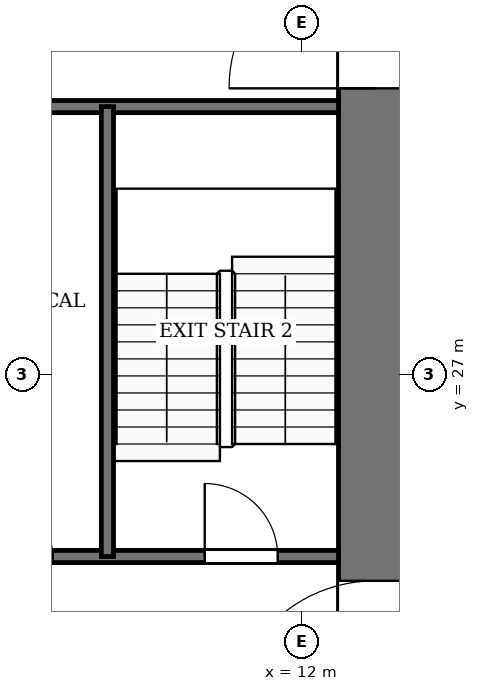
"""IFC4 building model, lengths in metres.
Left out: names, types, materials, properties, quantities, classifications, styles, units other than length and angle.
Written with IfcOpenShell. Run it as: python <this file> out.ifc"""

import sys

from ifc_helpers import new_model, si_unit, direction, frame, frame_2d, origin, place, context, subcontext, project, spatial, rectangle, extrude, element, fill, save


model = new_model("IFC4")
c1 = context("Model", 3, precision=1e-05, world=origin(), true_north=direction((0.0, 1.0)))
c2 = subcontext(c1, "Body", "Model", "MODEL_VIEW")
j1 = project(units=[si_unit("LENGTHUNIT", "METRE"), si_unit("PLANEANGLEUNIT", "RADIAN")], contexts=[c1])
p1 = place(None, origin())
s1 = spatial("IfcSite", under=j1, at=p1, CompositionType="ELEMENT")
p2 = place(p1, origin())
s2 = spatial("IfcBuilding", under=s1, at=p2, CompositionType="ELEMENT")
p3 = place(p2, frame((0.0, 0.0, 110.0)))
s3 = spatial("IfcBuildingStorey", under=s2, at=p3, CompositionType="ELEMENT", Elevation=110.0)
p4 = place(p3, frame((13.2, 18.4, -0.13), z_axis=(0.0, 0.0, 1.0), x_axis=(0.0, 1.0, 0.0)))
e1 = element("IfcWall", 1, at=p4, inside=s3, PredefinedType="SHEAR", context=c2, shape_type="SweptSolid", body=[
    extrude(rectangle(XDim=19.2, YDim=1.2, at=frame_2d((9.6, 0.0))), origin(), (0.0, 0.0, 1.0), 3.88),
])
p5 = place(p4, frame((2.8, 0.0, 0.13)))
e2 = element("IfcOpeningElement", 2, at=p5, cuts=e1, PredefinedType="OPENING", context=c2, shape_type="SweptSolid", body=[
    extrude(rectangle(XDim=2.4, YDim=2.4, at=frame_2d((1.2, 1.2))), frame((0.0, 0.61, 0.0), z_axis=(0.0, -1.0, 0.0), x_axis=(1.0, 0.0, 0.0)), (0.0, 0.0, 1.0), 1.22),
])
p6 = place(p4, frame((13.3, 0.0, 0.13)))
e3 = element("IfcOpeningElement", 3, at=p6, cuts=e1, PredefinedType="OPENING", context=c2, shape_type="SweptSolid", body=[
    extrude(rectangle(XDim=2.4, YDim=2.4, at=frame_2d((1.2, 1.2))), frame((0.0, 0.61, 0.0), z_axis=(0.0, -1.0, 0.0), x_axis=(1.0, 0.0, 0.0)), (0.0, 0.0, 1.0), 1.22),
])
p7 = place(p3, frame((6.0, 24.0, 0.0), z_axis=(0.0, 0.0, 1.0), x_axis=(1.0, 0.0, 0.0)))
e4 = element("IfcWall", 4, at=p7, inside=s3, PredefinedType="PARTITIONING", context=c2, shape_type="SweptSolid", body=[
    extrude(rectangle(XDim=6.6, YDim=0.2, at=frame_2d((3.3, 0.0))), origin(), (0.0, 0.0, 1.0), 3.75),
])
p8 = place(p7, frame((0.9, 0.0, 0.0)))
e5 = element("IfcOpeningElement", 5, at=p8, cuts=e4, PredefinedType="OPENING", context=c2, shape_type="SweptSolid", body=[
    extrude(rectangle(XDim=1.0, YDim=2.1, at=frame_2d((0.5, 1.05))), frame((0.0, 0.11, 0.0), z_axis=(0.0, -1.0, 0.0), x_axis=(1.0, 0.0, 0.0)), (0.0, 0.0, 1.0), 0.22),
])
p9 = place(p7, frame((4.4, 0.0, 0.0)))
e6 = element("IfcOpeningElement", 6, at=p9, cuts=e4, PredefinedType="OPENING", context=c2, shape_type="SweptSolid", body=[
    extrude(rectangle(XDim=1.2, YDim=2.2, at=frame_2d((0.6, 1.1))), frame((0.0, 0.11, 0.0), z_axis=(0.0, -1.0, 0.0), x_axis=(1.0, 0.0, 0.0)), (0.0, 0.0, 1.0), 0.22),
])
p10 = place(p3, frame((6.0, 31.4, 0.0), z_axis=(0.0, 0.0, 1.0), x_axis=(1.0, 0.0, 0.0)))
e7 = element("IfcWall", 7, at=p10, inside=s3, PredefinedType="PARTITIONING", context=c2, shape_type="SweptSolid", body=[
    extrude(rectangle(XDim=6.6, YDim=0.2, at=frame_2d((3.3, 0.0))), origin(), (0.0, 0.0, 1.0), 3.75),
])
p11 = place(p3, frame((8.8, 24.0, 0.0), z_axis=(0.0, 0.0, 1.0), x_axis=(0.0, 1.0, 0.0)))
e8 = element("IfcWall", 8, at=p11, inside=s3, PredefinedType="PARTITIONING", context=c2, shape_type="SweptSolid", body=[
    extrude(rectangle(XDim=7.4, YDim=0.2, at=frame_2d((3.7, 0.0))), origin(), (0.0, 0.0, 1.0), 3.75),
])
p12 = place(p9, origin())
e9 = element("IfcDoor", 9, at=p12, inside=s3, OperationType="SINGLE_SWING_LEFT", PredefinedType="DOOR", context=c2, shape_type="SweptSolid", body=[
    extrude(rectangle(XDim=1.2, YDim=2.2, at=frame_2d((0.6, 1.1))), frame((0.0, 0.025, 0.0), z_axis=(0.0, -1.0, 0.0), x_axis=(1.0, 0.0, 0.0)), (0.0, 0.0, 1.0), 0.05),
])
fill(e6, e9)
p13 = place(p5, origin())
e10 = element("IfcDoor", 10, at=p13, inside=s3, OperationType="DOUBLE_DOOR_SINGLE_SWING", PredefinedType="DOOR", context=c2, shape_type="SweptSolid", body=[
    extrude(rectangle(XDim=2.4, YDim=2.4, at=frame_2d((1.2, 1.2))), frame((0.0, 0.025, 0.0), z_axis=(0.0, -1.0, 0.0), x_axis=(1.0, 0.0, 0.0)), (0.0, 0.0, 1.0), 0.05),
])
fill(e2, e10)
p14 = place(p6, origin())
e11 = element("IfcDoor", 11, at=p14, inside=s3, OperationType="DOUBLE_DOOR_SINGLE_SWING", PredefinedType="DOOR", context=c2, shape_type="SweptSolid", body=[
    extrude(rectangle(XDim=2.4, YDim=2.4, at=frame_2d((1.2, 1.2))), frame((0.0, 0.025, 0.0), z_axis=(0.0, -1.0, 0.0), x_axis=(1.0, 0.0, 0.0)), (0.0, 0.0, 1.0), 0.05),
])
fill(e3, e11)
save(model, sys.argv[1])
